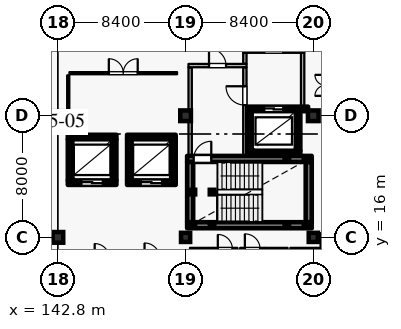
"""IFC4 building model, lengths in metres.
Left out: names, types, materials, properties, quantities, classifications, styles, units other than length and angle.
Written with IfcOpenShell. Run it as: python <this file> out.ifc"""

import sys

from ifc_helpers import new_model, si_unit, direction, frame, frame_2d, origin, origin_2d, place, context, subcontext, project, spatial, rectangle, hollow_rectangle, extrude, element, fill, save


model = new_model("IFC4")
c1 = context("Model", 3, precision=1e-05, world=origin(), true_north=direction((0.0, 1.0)))
c2 = subcontext(c1, "Body", "Model", "MODEL_VIEW")
j1 = project(units=[si_unit("LENGTHUNIT", "METRE"), si_unit("PLANEANGLEUNIT", "RADIAN")], contexts=[c1])
p1 = place(None, origin())
s1 = spatial("IfcSite", under=j1, at=p1, CompositionType="ELEMENT")
p2 = place(p1, origin())
s2 = spatial("IfcBuilding", under=s1, at=p2, CompositionType="ELEMENT")
p3 = place(p2, frame((0.0, 0.0, 32.4)))
s3 = spatial("IfcBuildingStorey", under=s2, at=p3, CompositionType="ELEMENT", Elevation=32.4)
for number, where, z_axis, x_axis in (
    (1, (142.8, 16.0, 0.0), (0.0, 0.0, 1.0), (1.0, 0.0, 0.0)),
    (2, (151.2, 24.0, 0.0), (0.0, 0.0, 1.0), (1.0, 0.0, 0.0)),
    (3, (159.6, 24.0, 0.0), (0.0, 0.0, 1.0), (1.0, 0.0, 0.0)),
):
    element("IfcColumn", number, at=place(p3, frame(where, z_axis=z_axis, x_axis=x_axis)), inside=s3, PredefinedType="COLUMN", context=c2, shape_type="SweptSolid", body=[
        extrude(rectangle(XDim=0.7, YDim=0.7, at=origin_2d()), origin(), (0.0, 0.0, 1.0), 3.6),
    ])
for number, where, z_axis, x_axis in (
    (4, (142.8, 24.0, 0.0), (0.0, 0.0, 1.0), (1.0, 0.0, 0.0)),
    (5, (151.2, 16.0, 0.0), (0.0, 0.0, 1.0), (1.0, 0.0, 0.0)),
    (6, (159.6, 16.0, 0.0), (0.0, 0.0, 1.0), (1.0, 0.0, 0.0)),
):
    element("IfcColumn", number, at=place(p3, frame(where, z_axis=z_axis, x_axis=x_axis)), inside=s3, PredefinedType="COLUMN", context=c2, shape_type="SweptSolid", body=[
        extrude(rectangle(XDim=0.6, YDim=0.6, at=origin_2d()), origin(), (0.0, 0.0, 1.0), 3.6),
    ])
p4 = place(p3, frame((167.65, 15.667, 0.0), z_axis=(0.0, 0.0, 1.0), x_axis=(-0.724105170588, -0.689689569247, 0.0)))
e7 = element("IfcWall", 7, at=p4, inside=s3, PredefinedType="SOLIDWALL", context=c2, shape_type="SweptSolid", body=[
    extrude(rectangle(XDim=10.634, YDim=0.24, at=frame_2d((5.317, 0.0))), origin(), (0.0, 0.0, 1.0), 2.89),
])
p5 = place(p4, frame((0.983, 0.0, 0.0)))
e8 = element("IfcOpeningElement", 8, at=p5, cuts=e7, PredefinedType="OPENING", context=c2, shape_type="SweptSolid", body=[
    extrude(rectangle(XDim=1.5, YDim=2.25, at=frame_2d((0.75, 1.125))), frame((0.0, 0.13, 0.0), z_axis=(0.0, -1.0, 0.0), x_axis=(1.0, 0.0, 0.0)), (0.0, 0.0, 1.0), 0.26),
])
p6 = place(p4, frame((5.035, 0.0, 0.8)))
e9 = element("IfcOpeningElement", 9, at=p6, cuts=e7, PredefinedType="OPENING", context=c2, shape_type="SweptSolid", body=[
    extrude(rectangle(XDim=2.0, YDim=1.75, at=frame_2d((1.0, 0.875))), frame((0.0, 0.13, 0.0), z_axis=(0.0, -1.0, 0.0), x_axis=(1.0, 0.0, 0.0)), (0.0, 0.0, 1.0), 0.26),
])
p7 = place(p4, frame((8.819, 0.0, 0.8)))
e10 = element("IfcOpeningElement", 10, at=p7, cuts=e7, PredefinedType="OPENING", context=c2, shape_type="SweptSolid", body=[
    extrude(rectangle(XDim=1.6, YDim=1.6, at=frame_2d((0.8, 0.8))), frame((0.0, 0.13, 0.0), z_axis=(0.0, -1.0, 0.0), x_axis=(1.0, 0.0, 0.0)), (0.0, 0.0, 1.0), 0.26),
])
p8 = place(p3, frame((155.25, 21.55, 0.0), z_axis=(0.0, 0.0, 1.0), x_axis=(1.0, 0.0, 0.0)))
e11 = element("IfcWall", 11, at=p8, inside=s3, PredefinedType="SHEAR", context=c2, shape_type="SweptSolid", body=[
    extrude(rectangle(XDim=3.5, YDim=0.3, at=frame_2d((1.75, 0.0))), origin(), (0.0, 0.0, 1.0), 3.335),
])
p9 = place(p3, frame((158.6, 21.705, 0.0), z_axis=(0.0, 0.0, 1.0), x_axis=(0.0, 1.0, 0.0)))
e12 = element("IfcWall", 12, at=p9, inside=s3, PredefinedType="SHEAR", context=c2, shape_type="SweptSolid", body=[
    extrude(rectangle(XDim=2.59, YDim=0.3, at=frame_2d((1.295, 0.0))), origin(), (0.0, 0.0, 1.0), 3.335),
])
p10 = place(p3, frame((159.26, 24.45, 0.0), z_axis=(0.0, 0.0, 1.0), x_axis=(-1.0, 0.0, 0.0)))
e13 = element("IfcWall", 13, at=p10, inside=s3, PredefinedType="SHEAR", context=c2, shape_type="SweptSolid", body=[
    extrude(rectangle(XDim=4.01, YDim=0.3, at=frame_2d((2.005, 0.0))), origin(), (0.0, 0.0, 1.0), 3.335),
])
p11 = place(p10, frame((1.635, 0.0, 0.0)))
e14 = element("IfcOpeningElement", 14, at=p11, cuts=e13, PredefinedType="OPENING", context=c2, shape_type="SweptSolid", body=[
    extrude(rectangle(XDim=1.25, YDim=2.25, at=frame_2d((0.625, 1.125))), frame((0.0, 0.16, 0.0), z_axis=(0.0, -1.0, 0.0), x_axis=(1.0, 0.0, 0.0)), (0.0, 0.0, 1.0), 0.32),
])
p12 = place(p3, frame((155.4, 24.295, 0.0), z_axis=(0.0, 0.0, 1.0), x_axis=(0.0, -1.0, 0.0)))
e15 = element("IfcWall", 15, at=p12, inside=s3, PredefinedType="SHEAR", context=c2, shape_type="SweptSolid", body=[
    extrude(rectangle(XDim=2.59, YDim=0.3, at=frame_2d((1.295, 0.0))), origin(), (0.0, 0.0, 1.0), 3.335),
])
p13 = place(p3, frame((143.45, 19.6, 0.0), z_axis=(0.0, 0.0, 1.0), x_axis=(1.0, 0.0, 0.0)))
e16 = element("IfcWall", 16, at=p13, inside=s3, PredefinedType="SHEAR", context=c2, shape_type="SweptSolid", body=[
    extrude(rectangle(XDim=3.2, YDim=0.3, at=frame_2d((1.6, 0.0))), origin(), (0.0, 0.0, 1.0), 3.335),
])
p14 = place(p13, frame((0.9, 0.0, 0.0)))
e17 = element("IfcOpeningElement", 17, at=p14, cuts=e16, PredefinedType="OPENING", context=c2, shape_type="SweptSolid", body=[
    extrude(rectangle(XDim=1.4, YDim=2.35, at=frame_2d((0.7, 1.175))), frame((0.0, 0.16, 0.0), z_axis=(0.0, -1.0, 0.0), x_axis=(1.0, 0.0, 0.0)), (0.0, 0.0, 1.0), 0.32),
])
p15 = place(p3, frame((146.5, 19.755, 0.0), z_axis=(0.0, 0.0, 1.0), x_axis=(0.0, 1.0, 0.0)))
e18 = element("IfcWall", 18, at=p15, inside=s3, PredefinedType="SHEAR", context=c2, shape_type="SweptSolid", body=[
    extrude(rectangle(XDim=2.69, YDim=0.3, at=frame_2d((1.345, 0.0))), origin(), (0.0, 0.0, 1.0), 3.335),
])
p16 = place(p3, frame((146.65, 22.6, 0.0), z_axis=(0.0, 0.0, 1.0), x_axis=(-1.0, 0.0, 0.0)))
e19 = element("IfcWall", 19, at=p16, inside=s3, PredefinedType="SHEAR", context=c2, shape_type="SweptSolid", body=[
    extrude(rectangle(XDim=3.2, YDim=0.3, at=frame_2d((1.6, 0.0))), origin(), (0.0, 0.0, 1.0), 3.335),
])
p17 = place(p3, frame((143.6, 22.445, 0.0), z_axis=(0.0, 0.0, 1.0), x_axis=(0.0, -1.0, 0.0)))
e20 = element("IfcWall", 20, at=p17, inside=s3, PredefinedType="SHEAR", context=c2, shape_type="SweptSolid", body=[
    extrude(rectangle(XDim=2.69, YDim=0.3, at=frame_2d((1.345, 0.0))), origin(), (0.0, 0.0, 1.0), 3.335),
])
p18 = place(p3, frame((147.35, 19.6, 0.0), z_axis=(0.0, 0.0, 1.0), x_axis=(1.0, 0.0, 0.0)))
e21 = element("IfcWall", 21, at=p18, inside=s3, PredefinedType="SHEAR", context=c2, shape_type="SweptSolid", body=[
    extrude(rectangle(XDim=3.2, YDim=0.3, at=frame_2d((1.6, 0.0))), origin(), (0.0, 0.0, 1.0), 3.335),
])
p19 = place(p18, frame((0.9, 0.0, 0.0)))
e22 = element("IfcOpeningElement", 22, at=p19, cuts=e21, PredefinedType="OPENING", context=c2, shape_type="SweptSolid", body=[
    extrude(rectangle(XDim=1.4, YDim=2.35, at=frame_2d((0.7, 1.175))), frame((0.0, 0.16, 0.0), z_axis=(0.0, -1.0, 0.0), x_axis=(1.0, 0.0, 0.0)), (0.0, 0.0, 1.0), 0.32),
])
p20 = place(p3, frame((150.4, 19.755, 0.0), z_axis=(0.0, 0.0, 1.0), x_axis=(0.0, 1.0, 0.0)))
e23 = element("IfcWall", 23, at=p20, inside=s3, PredefinedType="SHEAR", context=c2, shape_type="SweptSolid", body=[
    extrude(rectangle(XDim=2.69, YDim=0.3, at=frame_2d((1.345, 0.0))), origin(), (0.0, 0.0, 1.0), 3.335),
])
p21 = place(p3, frame((150.55, 22.6, 0.0), z_axis=(0.0, 0.0, 1.0), x_axis=(-1.0, 0.0, 0.0)))
e24 = element("IfcWall", 24, at=p21, inside=s3, PredefinedType="SHEAR", context=c2, shape_type="SweptSolid", body=[
    extrude(rectangle(XDim=3.2, YDim=0.3, at=frame_2d((1.6, 0.0))), origin(), (0.0, 0.0, 1.0), 3.335),
])
p22 = place(p3, frame((147.5, 22.445, 0.0), z_axis=(0.0, 0.0, 1.0), x_axis=(0.0, -1.0, 0.0)))
e25 = element("IfcWall", 25, at=p22, inside=s3, PredefinedType="SHEAR", context=c2, shape_type="SweptSolid", body=[
    extrude(rectangle(XDim=2.69, YDim=0.3, at=frame_2d((1.345, 0.0))), origin(), (0.0, 0.0, 1.0), 3.335),
])
p23 = place(p3, frame((151.3, 16.8, 0.0), z_axis=(0.0, 0.0, 1.0), x_axis=(1.0, 0.0, 0.0)))
e26 = element("IfcWall", 26, at=p23, inside=s3, PredefinedType="SHEAR", context=c2, shape_type="SweptSolid", body=[
    extrude(rectangle(XDim=8.2, YDim=0.4, at=frame_2d((4.1, 0.0))), origin(), (0.0, 0.0, 1.0), 3.335),
])
p24 = place(p3, frame((159.3, 17.005, 0.0), z_axis=(0.0, 0.0, 1.0), x_axis=(0.0, 1.0, 0.0)))
e27 = element("IfcWall", 27, at=p24, inside=s3, PredefinedType="SHEAR", context=c2, shape_type="SweptSolid", body=[
    extrude(rectangle(XDim=3.95, YDim=0.4, at=frame_2d((1.975, 0.0))), origin(), (0.0, 0.0, 1.0), 3.335),
])
p25 = place(p3, frame((151.3, 21.16, 0.0), z_axis=(0.0, 0.0, 1.0), x_axis=(1.0, 0.0, 0.0)))
e28 = element("IfcWall", 28, at=p25, inside=s3, PredefinedType="SHEAR", context=c2, shape_type="SweptSolid", body=[
    extrude(rectangle(XDim=8.2, YDim=0.4, at=frame_2d((4.1, 0.0))), origin(), (0.0, 0.0, 1.0), 3.335),
])
p26 = place(p25, frame((0.43, 0.0, 0.0)))
e29 = element("IfcOpeningElement", 29, at=p26, cuts=e28, PredefinedType="OPENING", context=c2, shape_type="SweptSolid", body=[
    extrude(rectangle(XDim=1.16, YDim=2.2, at=frame_2d((0.58, 1.1))), frame((0.0, 0.21, 0.0), z_axis=(0.0, -1.0, 0.0), x_axis=(1.0, 0.0, 0.0)), (0.0, 0.0, 1.0), 0.42),
])
p27 = place(p3, frame((151.5, 17.005, 0.0), z_axis=(0.0, 0.0, 1.0), x_axis=(0.0, 1.0, 0.0)))
e30 = element("IfcWall", 30, at=p27, inside=s3, PredefinedType="SHEAR", context=c2, shape_type="SweptSolid", body=[
    extrude(rectangle(XDim=3.95, YDim=0.4, at=frame_2d((1.975, 0.0))), origin(), (0.0, 0.0, 1.0), 3.335),
])
p28 = place(p3, frame((151.5, 21.365, 0.0), z_axis=(0.0, 0.0, 1.0), x_axis=(0.0, 1.0, 0.0)))
e31 = element("IfcWall", 31, at=p28, inside=s3, PredefinedType="PARTITIONING", context=c2, shape_type="SweptSolid", body=[
    extrude(rectangle(XDim=5.82, YDim=0.22, at=frame_2d((2.91, 0.0))), origin(), (0.0, 0.0, 1.0), 3.335),
])
p29 = place(p3, frame((151.39, 27.3, 0.0), z_axis=(0.0, 0.0, 1.0), x_axis=(1.0, 0.0, 0.0)))
e32 = element("IfcWall", 32, at=p29, inside=s3, PredefinedType="PARTITIONING", context=c2, shape_type="SweptSolid", body=[
    extrude(rectangle(XDim=3.82, YDim=0.22, at=frame_2d((1.91, 0.0))), origin(), (0.0, 0.0, 1.0), 3.335),
])
p30 = place(p29, frame((1.35, 0.0, 0.0)))
e33 = element("IfcOpeningElement", 33, at=p30, cuts=e32, PredefinedType="OPENING", context=c2, shape_type="SweptSolid", body=[
    extrude(rectangle(XDim=1.12, YDim=2.2, at=frame_2d((0.56, 1.1))), frame((0.0, 0.12, 0.0), z_axis=(0.0, -1.0, 0.0), x_axis=(1.0, 0.0, 0.0)), (0.0, 0.0, 1.0), 0.24),
])
p31 = place(p3, frame((155.1, 21.365, 0.0), z_axis=(0.0, 0.0, 1.0), x_axis=(0.0, 1.0, 0.0)))
e34 = element("IfcWall", 34, at=p31, inside=s3, PredefinedType="PARTITIONING", context=c2, shape_type="SweptSolid", body=[
    extrude(rectangle(XDim=5.82, YDim=0.22, at=frame_2d((2.91, 0.0))), origin(), (0.0, 0.0, 1.0), 3.335),
])
p32 = place(p31, frame((3.335, 0.0, 0.0)))
e35 = element("IfcOpeningElement", 35, at=p32, cuts=e34, PredefinedType="OPENING", context=c2, shape_type="SweptSolid", body=[
    extrude(rectangle(XDim=1.24, YDim=2.2, at=frame_2d((0.62, 1.1))), frame((0.0, 0.12, 0.0), z_axis=(0.0, -1.0, 0.0), x_axis=(1.0, 0.0, 0.0)), (0.0, 0.0, 1.0), 0.24),
])
p33 = place(p3, frame((155.1, 27.415, 0.0), z_axis=(0.0, 0.0, 1.0), x_axis=(0.0, 1.0, 0.0)))
e36 = element("IfcWall", 36, at=p33, inside=s3, PredefinedType="PARTITIONING", context=c2, shape_type="SweptSolid", body=[
    extrude(rectangle(XDim=0.72, YDim=0.22, at=frame_2d((0.36, 0.0))), origin(), (0.0, 0.0, 1.0), 3.335),
])
p34 = place(p3, frame((158.9, 24.605, 0.0), z_axis=(0.0, 0.0, 1.0), x_axis=(0.0, 1.0, 0.0)))
e37 = element("IfcWall", 37, at=p34, inside=s3, PredefinedType="PARTITIONING", context=c2, shape_type="SweptSolid", body=[
    extrude(rectangle(XDim=3.53, YDim=0.22, at=frame_2d((1.765, 0.0))), origin(), (0.0, 0.0, 1.0), 3.335),
])
p35 = place(p3, frame((154.99, 28.25, 0.0), z_axis=(0.0, 0.0, 1.0), x_axis=(1.0, 0.0, 0.0)))
e38 = element("IfcWall", 38, at=p35, inside=s3, PredefinedType="PARTITIONING", context=c2, shape_type="SweptSolid", body=[
    extrude(rectangle(XDim=4.02, YDim=0.22, at=frame_2d((2.01, 0.0))), origin(), (0.0, 0.0, 1.0), 3.335),
])
p36 = place(p35, frame((1.39, 0.0, 0.0)))
e39 = element("IfcOpeningElement", 39, at=p36, cuts=e38, PredefinedType="OPENING", context=c2, shape_type="SweptSolid", body=[
    extrude(rectangle(XDim=1.24, YDim=2.2, at=frame_2d((0.62, 1.1))), frame((0.0, 0.12, 0.0), z_axis=(0.0, -1.0, 0.0), x_axis=(1.0, 0.0, 0.0)), (0.0, 0.0, 1.0), 0.24),
])
for number, where, z_axis, x_axis in (
    (40, (151.68, 16.8, 0.0), (0.0, 0.0, 1.0), (1.0, 0.0, 0.0)),
    (41, (151.68, 18.98, 0.0), (0.0, 0.0, 1.0), (1.0, 0.0, 0.0)),
    (42, (152.94, 16.8, 0.0), (0.0, 0.0, 1.0), (1.0, 0.0, 0.0)),
    (43, (152.94, 18.98, 0.0), (0.0, 0.0, 1.0), (1.0, 0.0, 0.0)),
):
    element("IfcColumn", number, at=place(p3, frame(where, z_axis=z_axis, x_axis=x_axis)), inside=s3, PredefinedType="COLUMN", context=c2, shape_type="SweptSolid", body=[
        extrude(hollow_rectangle(XDim=0.3, YDim=0.3, WallThickness=0.012, at=origin_2d()), origin(), (0.0, 0.0, 1.0), 3.42),
    ])
for number, where, z_axis, x_axis in (
    (44, (157.86, 16.8, -1.8), (0.0, 0.0, 1.0), (1.0, 0.0, 0.0)),
    (45, (157.86, 21.16, -1.8), (0.0, 0.0, 1.0), (1.0, 0.0, 0.0)),
    (46, (159.12, 16.8, -1.8), (0.0, 0.0, 1.0), (1.0, 0.0, 0.0)),
    (47, (159.12, 21.16, -1.8), (0.0, 0.0, 1.0), (1.0, 0.0, 0.0)),
):
    element("IfcColumn", number, at=place(p3, frame(where, z_axis=z_axis, x_axis=x_axis)), inside=s3, PredefinedType="COLUMN", context=c2, shape_type="SweptSolid", body=[
        extrude(hollow_rectangle(XDim=0.3, YDim=0.3, WallThickness=0.012, at=origin_2d()), origin(), (0.0, 0.0, 1.0), 3.42),
    ])
p37 = place(p3, frame((151.49, 15.23, 0.0), z_axis=(0.0, 0.0, 1.0), x_axis=(1.0, 0.0, 0.0)))
e48 = element("IfcWall", 48, at=p37, inside=s3, PredefinedType="PARTITIONING", context=c2, shape_type="SweptSolid", body=[
    extrude(rectangle(XDim=1.49, YDim=0.16, at=frame_2d((0.745, 0.0))), origin(), (0.0, 0.0, 1.0), 3.335),
])
p38 = place(p3, frame((152.99, 15.23, 0.0), z_axis=(0.0, 0.0, 1.0), x_axis=(1.0, 0.0, 0.0)))
e49 = element("IfcWall", 49, at=p38, inside=s3, PredefinedType="PARTITIONING", context=c2, shape_type="SweptSolid", body=[
    extrude(rectangle(XDim=1.62, YDim=0.16, at=frame_2d((0.81, 0.0))), origin(), (0.0, 0.0, 1.0), 3.335),
])
p39 = place(p38, frame((0.33, 0.0, 0.0)))
e50 = element("IfcOpeningElement", 50, at=p39, cuts=e49, PredefinedType="OPENING", context=c2, shape_type="SweptSolid", body=[
    extrude(rectangle(XDim=0.96, YDim=2.2, at=frame_2d((0.48, 1.1))), frame((0.0, 0.09, 0.0), z_axis=(0.0, -1.0, 0.0), x_axis=(1.0, 0.0, 0.0)), (0.0, 0.0, 1.0), 0.18),
])
p40 = place(p3, frame((154.79, 15.23, 0.0), z_axis=(0.0, 0.0, 1.0), x_axis=(1.0, 0.0, 0.0)))
e51 = element("IfcWall", 51, at=p40, inside=s3, PredefinedType="PARTITIONING", context=c2, shape_type="SweptSolid", body=[
    extrude(rectangle(XDim=1.62, YDim=0.16, at=frame_2d((0.81, 0.0))), origin(), (0.0, 0.0, 1.0), 3.335),
])
p41 = place(p40, frame((0.31, 0.0, 0.0)))
e52 = element("IfcOpeningElement", 52, at=p41, cuts=e51, PredefinedType="OPENING", context=c2, shape_type="SweptSolid", body=[
    extrude(rectangle(XDim=1.0, YDim=2.25, at=frame_2d((0.5, 1.125))), frame((0.0, 0.09, 0.0), z_axis=(0.0, -1.0, 0.0), x_axis=(1.0, 0.0, 0.0)), (0.0, 0.0, 1.0), 0.18),
])
p42 = place(p3, frame((156.42, 15.23, 0.0), z_axis=(0.0, 0.0, 1.0), x_axis=(1.0, 0.0, 0.0)))
e53 = element("IfcWall", 53, at=p42, inside=s3, PredefinedType="PARTITIONING", context=c2, shape_type="SweptSolid", body=[
    extrude(rectangle(XDim=1.49, YDim=0.16, at=frame_2d((0.745, 0.0))), origin(), (0.0, 0.0, 1.0), 3.335),
])
p43 = place(p3, frame((158.09, 15.23, 0.0), z_axis=(0.0, 0.0, 1.0), x_axis=(1.0, 0.0, 0.0)))
e54 = element("IfcWall", 54, at=p43, inside=s3, PredefinedType="PARTITIONING", context=c2, shape_type="SweptSolid", body=[
    extrude(rectangle(XDim=1.71, YDim=0.16, at=frame_2d((0.855, 0.0))), origin(), (0.0, 0.0, 1.0), 3.335),
])
p44 = place(p3, frame((159.81, 15.23, 0.0), z_axis=(0.0, 0.0, 1.0), x_axis=(1.0, 0.0, 0.0)))
e55 = element("IfcWall", 55, at=p44, inside=s3, PredefinedType="PARTITIONING", context=c2, shape_type="SweptSolid", body=[
    extrude(rectangle(XDim=1.62, YDim=0.16, at=frame_2d((0.81, 0.0))), origin(), (0.0, 0.0, 1.0), 3.335),
])
p45 = place(p44, frame((0.27, 0.0, 0.0)))
e56 = element("IfcOpeningElement", 56, at=p45, cuts=e55, PredefinedType="OPENING", context=c2, shape_type="SweptSolid", body=[
    extrude(rectangle(XDim=1.08, YDim=2.3, at=frame_2d((0.54, 1.15))), frame((0.0, 0.09, 0.0), z_axis=(0.0, -1.0, 0.0), x_axis=(1.0, 0.0, 0.0)), (0.0, 0.0, 1.0), 0.18),
])
p46 = place(p3, frame((143.56, 26.8, 0.0), z_axis=(0.0, 0.0, 1.0), x_axis=(1.0, 0.0, 0.0)))
e57 = element("IfcWall", 57, at=p46, inside=s3, PredefinedType="PARTITIONING", context=c2, shape_type="SweptSolid", body=[
    extrude(rectangle(XDim=7.08, YDim=0.14, at=frame_2d((3.54, 0.0))), origin(), (0.0, 0.0, 1.0), 3.335),
])
p47 = place(p46, frame((2.59, 0.0, 0.0)))
e58 = element("IfcOpeningElement", 58, at=p47, cuts=e57, PredefinedType="OPENING", context=c2, shape_type="SweptSolid", body=[
    extrude(rectangle(XDim=1.9, YDim=2.4, at=frame_2d((0.95, 1.2))), frame((0.0, 0.08, 0.0), z_axis=(0.0, -1.0, 0.0), x_axis=(1.0, 0.0, 0.0)), (0.0, 0.0, 1.0), 0.16),
])
p48 = place(p3, frame((143.48, 23.45, 0.0), z_axis=(0.0, 0.0, 1.0), x_axis=(0.0, 1.0, 0.0)))
e59 = element("IfcWall", 59, at=p48, inside=s3, PredefinedType="PARTITIONING", context=c2, shape_type="SweptSolid", body=[
    extrude(rectangle(XDim=3.21, YDim=0.14, at=frame_2d((1.605, 0.0))), origin(), (0.0, 0.0, 1.0), 3.335),
])
p49 = place(p11, origin())
e60 = element("IfcDoor", 60, at=p49, inside=s3, OperationType="DOUBLE_DOOR_SLIDING", PredefinedType="DOOR", context=c2, shape_type="SweptSolid", body=[
    extrude(rectangle(XDim=1.25, YDim=2.25, at=frame_2d((0.625, 1.125))), frame((0.0, 0.025, 0.0), z_axis=(0.0, -1.0, 0.0), x_axis=(1.0, 0.0, 0.0)), (0.0, 0.0, 1.0), 0.05),
])
fill(e14, e60)
p50 = place(p14, origin())
e61 = element("IfcDoor", 61, at=p50, inside=s3, OperationType="DOUBLE_DOOR_SLIDING", PredefinedType="DOOR", context=c2, shape_type="SweptSolid", body=[
    extrude(rectangle(XDim=1.4, YDim=2.35, at=frame_2d((0.7, 1.175))), frame((0.0, 0.025, 0.0), z_axis=(0.0, -1.0, 0.0), x_axis=(1.0, 0.0, 0.0)), (0.0, 0.0, 1.0), 0.05),
])
fill(e17, e61)
p51 = place(p19, origin())
e62 = element("IfcDoor", 62, at=p51, inside=s3, OperationType="DOUBLE_DOOR_SLIDING", PredefinedType="DOOR", context=c2, shape_type="SweptSolid", body=[
    extrude(rectangle(XDim=1.4, YDim=2.35, at=frame_2d((0.7, 1.175))), frame((0.0, 0.025, 0.0), z_axis=(0.0, -1.0, 0.0), x_axis=(1.0, 0.0, 0.0)), (0.0, 0.0, 1.0), 0.05),
])
fill(e22, e62)
p52 = place(p26, origin())
e63 = element("IfcDoor", 63, at=p52, inside=s3, OperationType="SINGLE_SWING_RIGHT", PredefinedType="DOOR", context=c2, shape_type="SweptSolid", body=[
    extrude(rectangle(XDim=1.16, YDim=2.2, at=frame_2d((0.58, 1.1))), frame((0.0, 0.025, 0.0), z_axis=(0.0, -1.0, 0.0), x_axis=(1.0, 0.0, 0.0)), (0.0, 0.0, 1.0), 0.05),
])
fill(e29, e63)
p53 = place(p30, origin())
e64 = element("IfcDoor", 64, at=p53, inside=s3, OperationType="SINGLE_SWING_LEFT", PredefinedType="DOOR", context=c2, shape_type="SweptSolid", body=[
    extrude(rectangle(XDim=1.12, YDim=2.2, at=frame_2d((0.56, 1.1))), frame((0.0, 0.025, 0.0), z_axis=(0.0, -1.0, 0.0), x_axis=(1.0, 0.0, 0.0)), (0.0, 0.0, 1.0), 0.05),
])
fill(e33, e64)
p54 = place(p32, origin())
e65 = element("IfcDoor", 65, at=p54, inside=s3, OperationType="SINGLE_SWING_RIGHT", PredefinedType="DOOR", context=c2, shape_type="SweptSolid", body=[
    extrude(rectangle(XDim=1.24, YDim=2.2, at=frame_2d((0.62, 1.1))), frame((0.0, 0.025, 0.0), z_axis=(0.0, -1.0, 0.0), x_axis=(1.0, 0.0, 0.0)), (0.0, 0.0, 1.0), 0.05),
])
fill(e35, e65)
p55 = place(p39, origin())
e66 = element("IfcDoor", 66, at=p55, inside=s3, OperationType="SINGLE_SWING_LEFT", PredefinedType="DOOR", context=c2, shape_type="SweptSolid", body=[
    extrude(rectangle(XDim=0.96, YDim=2.2, at=frame_2d((0.48, 1.1))), frame((0.0, 0.025, 0.0), z_axis=(0.0, -1.0, 0.0), x_axis=(1.0, 0.0, 0.0)), (0.0, 0.0, 1.0), 0.05),
])
fill(e50, e66)
p56 = place(p41, origin())
e67 = element("IfcDoor", 67, at=p56, inside=s3, OperationType="SINGLE_SWING_LEFT", PredefinedType="DOOR", context=c2, shape_type="SweptSolid", body=[
    extrude(rectangle(XDim=1.0, YDim=2.25, at=frame_2d((0.5, 1.125))), frame((0.0, 0.025, 0.0), z_axis=(0.0, -1.0, 0.0), x_axis=(1.0, 0.0, 0.0)), (0.0, 0.0, 1.0), 0.05),
])
fill(e52, e67)
p57 = place(p47, origin())
e68 = element("IfcDoor", 68, at=p57, inside=s3, OperationType="DOUBLE_DOOR_SINGLE_SWING", PredefinedType="DOOR", context=c2, shape_type="SweptSolid", body=[
    extrude(rectangle(XDim=1.9, YDim=2.4, at=frame_2d((0.95, 1.2))), frame((0.0, 0.025, 0.0), z_axis=(0.0, -1.0, 0.0), x_axis=(1.0, 0.0, 0.0)), (0.0, 0.0, 1.0), 0.05),
])
fill(e58, e68)
save(model, sys.argv[1])
